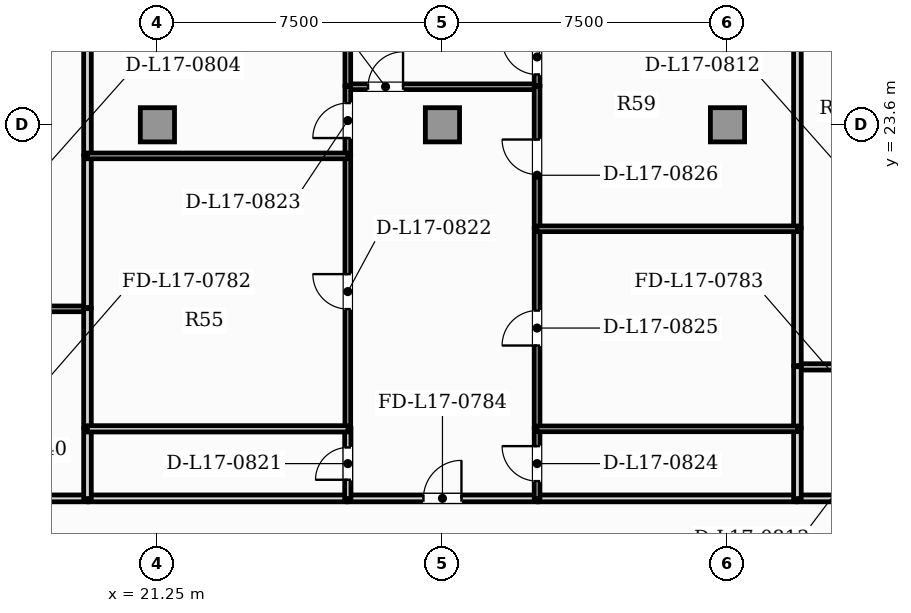
"""IFC4 building model, lengths in metres.
Left out: names, types, materials, properties, quantities, classifications, styles, units other than length and angle.
Written with IfcOpenShell. Run it as: python <this file> out.ifc"""

import sys

from ifc_helpers import new_model, si_unit, direction, frame, frame_2d, origin, origin_2d, place, context, subcontext, project, spatial, rectangle, extrude, element, fill, save


model = new_model("IFC4")
c1 = context("Model", 3, precision=1e-05, world=origin(), true_north=direction((0.0, 1.0)))
c2 = subcontext(c1, "Body", "Model", "MODEL_VIEW")
j1 = project(units=[si_unit("LENGTHUNIT", "METRE"), si_unit("PLANEANGLEUNIT", "RADIAN")], contexts=[c1])
p1 = place(None, origin())
s1 = spatial("IfcSite", under=j1, at=p1, CompositionType="ELEMENT")
p2 = place(p1, origin())
s2 = spatial("IfcBuilding", under=s1, at=p2, CompositionType="ELEMENT")
p3 = place(p2, frame((0.0, 0.0, 72.15)))
s3 = spatial("IfcBuildingStorey", under=s2, at=p3, CompositionType="ELEMENT", Elevation=72.15)
for number, where, z_axis, x_axis in (
    (1, (21.25, 23.6, 0.0), (0.0, 0.0, 1.0), (1.0, 0.0, 0.0)),
    (2, (28.75, 23.6, 0.0), (0.0, 0.0, 1.0), (1.0, 0.0, 0.0)),
    (3, (36.25, 23.6, 0.0), (0.0, 0.0, 1.0), (1.0, 0.0, 0.0)),
):
    element("IfcColumn", number, at=place(p3, frame(where, z_axis=z_axis, x_axis=x_axis)), inside=s3, PredefinedType="COLUMN", context=c2, shape_type="SweptSolid", body=[
        extrude(rectangle(XDim=0.9, YDim=0.9, at=origin_2d()), origin(), (0.0, 0.0, 1.0), 3.85),
    ])
p4 = place(p3, frame((17.268, 13.77, 0.0), z_axis=(0.0, 0.0, 1.0), x_axis=(1.0, 0.0, 0.0)))
e4 = element("IfcWall", 4, at=p4, inside=s3, PredefinedType="PARTITIONING", context=c2, shape_type="SweptSolid", body=[
    extrude(rectangle(XDim=2.147, YDim=0.18, at=frame_2d((1.074, 0.0))), origin(), (0.0, 0.0, 1.0), 3.57),
])
p5 = place(p3, frame((38.085, 13.77, 0.0), z_axis=(0.0, 0.0, 1.0), x_axis=(1.0, 0.0, 0.0)))
e5 = element("IfcWall", 5, at=p5, inside=s3, PredefinedType="PARTITIONING", context=c2, shape_type="SweptSolid", body=[
    extrude(rectangle(XDim=2.162, YDim=0.18, at=frame_2d((1.081, 0.0))), origin(), (0.0, 0.0, 1.0), 3.57),
])
p6 = place(p3, frame((26.255, 13.77, 0.0), z_axis=(0.0, 0.0, 1.0), x_axis=(1.0, 0.0, 0.0)))
e6 = element("IfcWall", 6, at=p6, inside=s3, PredefinedType="PARTITIONING", context=c2, shape_type="SweptSolid", body=[
    extrude(rectangle(XDim=4.99, YDim=0.18, at=frame_2d((2.495, 0.0))), origin(), (0.0, 0.0, 1.0), 3.57),
])
p7 = place(p6, frame((1.995, 0.0, 0.0)))
e7 = element("IfcOpeningElement", 7, at=p7, cuts=e6, PredefinedType="OPENING", context=c2, shape_type="SweptSolid", body=[
    extrude(rectangle(XDim=1.0, YDim=2.15, at=frame_2d((0.5, 1.075))), frame((0.0, 0.1, 0.0), z_axis=(0.0, -1.0, 0.0), x_axis=(1.0, 0.0, 0.0)), (0.0, 0.0, 1.0), 0.2),
])
for number, where, z_axis, x_axis in (
    (8, (19.445, 13.77, 0.0), (0.0, 0.0, 1.0), (1.0, 0.0, 0.0)),
    (9, (31.275, 13.77, 0.0), (0.0, 0.0, 1.0), (1.0, 0.0, 0.0)),
):
    element("IfcWall", number, at=place(p3, frame(where, z_axis=z_axis, x_axis=x_axis)), inside=s3, PredefinedType="PARTITIONING", context=c2, shape_type="SweptSolid", body=[
        extrude(rectangle(XDim=6.78, YDim=0.18, at=frame_2d((3.39, 0.0))), origin(), (0.0, 0.0, 1.0), 3.57),
    ])
p8 = place(p3, frame((17.228, 18.757, 0.0), z_axis=(0.0, 0.0, 1.0), x_axis=(1.0, 0.0, 0.0)))
e10 = element("IfcWall", 10, at=p8, inside=s3, PredefinedType="PARTITIONING", context=c2, shape_type="SweptSolid", body=[
    extrude(rectangle(XDim=2.187, YDim=0.15, at=frame_2d((1.094, 0.0))), origin(), (0.0, 0.0, 1.0), 3.57),
])
p9 = place(p3, frame((19.41, 13.765, 0.0), z_axis=(0.0, 0.0, 1.0), x_axis=(0.0, 1.0, 0.0)))
e11 = element("IfcWall", 11, at=p9, inside=s3, PredefinedType="PARTITIONING", context=c2, shape_type="SweptSolid", body=[
    extrude(rectangle(XDim=1.84, YDim=0.2, at=frame_2d((0.92, 0.0))), origin(), (0.0, 0.0, 1.0), 3.57),
])
p10 = place(p3, frame((19.41, 15.635, 0.0), z_axis=(0.0, 0.0, 1.0), x_axis=(0.0, 1.0, 0.0)))
e12 = element("IfcWall", 12, at=p10, inside=s3, PredefinedType="PARTITIONING", context=c2, shape_type="SweptSolid", body=[
    extrude(rectangle(XDim=3.127, YDim=0.2, at=frame_2d((1.563, 0.0))), origin(), (0.0, 0.0, 1.0), 3.57),
])
p11 = place(p3, frame((19.41, 18.792, 0.0), z_axis=(0.0, 0.0, 1.0), x_axis=(0.0, 1.0, 0.0)))
e13 = element("IfcWall", 13, at=p11, inside=s3, PredefinedType="PARTITIONING", context=c2, shape_type="SweptSolid", body=[
    extrude(rectangle(XDim=3.995, YDim=0.2, at=frame_2d((1.998, 0.0))), origin(), (0.0, 0.0, 1.0), 3.57),
])
p12 = place(p3, frame((19.41, 22.817, 0.0), z_axis=(0.0, 0.0, 1.0), x_axis=(0.0, 1.0, 0.0)))
e14 = element("IfcWall", 14, at=p12, inside=s3, PredefinedType="PARTITIONING", context=c2, shape_type="SweptSolid", body=[
    extrude(rectangle(XDim=10.648, YDim=0.2, at=frame_2d((5.324, 0.0))), origin(), (0.0, 0.0, 1.0), 3.57),
])
p13 = place(p3, frame((38.085, 17.23, 0.0), z_axis=(0.0, 0.0, 1.0), x_axis=(1.0, 0.0, 0.0)))
e15 = element("IfcWall", 15, at=p13, inside=s3, PredefinedType="PLUMBINGWALL", context=c2, shape_type="SweptSolid", body=[
    extrude(rectangle(XDim=2.202, YDim=0.165, at=frame_2d((1.101, 0.0))), origin(), (0.0, 0.0, 1.0), 3.57),
])
p14 = place(p3, frame((38.09, 13.765, 0.0), z_axis=(0.0, 0.0, 1.0), x_axis=(0.0, 1.0, 0.0)))
e16 = element("IfcWall", 16, at=p14, inside=s3, PredefinedType="PARTITIONING", context=c2, shape_type="SweptSolid", body=[
    extrude(rectangle(XDim=1.84, YDim=0.2, at=frame_2d((0.92, 0.0))), origin(), (0.0, 0.0, 1.0), 3.57),
])
p15 = place(p3, frame((38.09, 15.635, 0.0), z_axis=(0.0, 0.0, 1.0), x_axis=(0.0, 1.0, 0.0)))
e17 = element("IfcWall", 17, at=p15, inside=s3, PredefinedType="PARTITIONING", context=c2, shape_type="SweptSolid", body=[
    extrude(rectangle(XDim=1.6, YDim=0.2, at=frame_2d((0.8, 0.0))), origin(), (0.0, 0.0, 1.0), 3.57),
])
p16 = place(p3, frame((38.09, 17.265, 0.0), z_axis=(0.0, 0.0, 1.0), x_axis=(0.0, 1.0, 0.0)))
e18 = element("IfcWall", 18, at=p16, inside=s3, PredefinedType="PARTITIONING", context=c2, shape_type="SweptSolid", body=[
    extrude(rectangle(XDim=3.604, YDim=0.2, at=frame_2d((1.802, 0.0))), origin(), (0.0, 0.0, 1.0), 3.57),
])
p17 = place(p3, frame((38.09, 20.899, 0.0), z_axis=(0.0, 0.0, 1.0), x_axis=(0.0, 1.0, 0.0)))
e19 = element("IfcWall", 19, at=p17, inside=s3, PredefinedType="PARTITIONING", context=c2, shape_type="SweptSolid", body=[
    extrude(rectangle(XDim=5.234, YDim=0.2, at=frame_2d((2.617, 0.0))), origin(), (0.0, 0.0, 1.0), 3.57),
])
p18 = place(p3, frame((26.255, 24.601, 0.0), z_axis=(0.0, 0.0, 1.0), x_axis=(1.0, 0.0, 0.0)))
e20 = element("IfcWall", 20, at=p18, inside=s3, PredefinedType="PARTITIONING", context=c2, shape_type="SweptSolid", body=[
    extrude(rectangle(XDim=4.99, YDim=0.15, at=frame_2d((2.495, 0.0))), origin(), (0.0, 0.0, 1.0), 3.57),
])
p19 = place(p18, frame((0.538, 0.0, 0.0)))
e21 = element("IfcOpeningElement", 21, at=p19, cuts=e20, PredefinedType="OPENING", context=c2, shape_type="SweptSolid", body=[
    extrude(rectangle(XDim=0.92, YDim=2.1, at=frame_2d((0.46, 1.05))), frame((0.0, 0.085, 0.0), z_axis=(0.0, -1.0, 0.0), x_axis=(1.0, 0.0, 0.0)), (0.0, 0.0, 1.0), 0.17),
])
p20 = place(p3, frame((26.26, 13.765, 0.0), z_axis=(0.0, 0.0, 1.0), x_axis=(0.0, 1.0, 0.0)))
e22 = element("IfcWall", 22, at=p20, inside=s3, PredefinedType="PLUMBINGWALL", context=c2, shape_type="SweptSolid", body=[
    extrude(rectangle(XDim=1.84, YDim=0.165, at=frame_2d((0.92, 0.0))), origin(), (0.0, 0.0, 1.0), 3.57),
])
p21 = place(p20, frame((0.495, 0.0, 0.0)))
e23 = element("IfcOpeningElement", 23, at=p21, cuts=e22, PredefinedType="OPENING", context=c2, shape_type="SweptSolid", body=[
    extrude(rectangle(XDim=0.85, YDim=2.1, at=frame_2d((0.425, 1.05))), frame((0.0, 0.093, 0.0), z_axis=(0.0, -1.0, 0.0), x_axis=(1.0, 0.0, 0.0)), (0.0, 0.0, 1.0), 0.185),
])
p22 = place(p3, frame((26.26, 15.635, 0.0), z_axis=(0.0, 0.0, 1.0), x_axis=(0.0, 1.0, 0.0)))
e24 = element("IfcWall", 24, at=p22, inside=s3, PredefinedType="PARTITIONING", context=c2, shape_type="SweptSolid", body=[
    extrude(rectangle(XDim=7.152, YDim=0.15, at=frame_2d((3.576, 0.0))), origin(), (0.0, 0.0, 1.0), 3.57),
])
p23 = place(p22, frame((3.116, 0.0, 0.0)))
e25 = element("IfcOpeningElement", 25, at=p23, cuts=e24, PredefinedType="OPENING", context=c2, shape_type="SweptSolid", body=[
    extrude(rectangle(XDim=0.92, YDim=2.1, at=frame_2d((0.46, 1.05))), frame((0.0, 0.085, 0.0), z_axis=(0.0, -1.0, 0.0), x_axis=(1.0, 0.0, 0.0)), (0.0, 0.0, 1.0), 0.17),
])
p24 = place(p3, frame((26.26, 22.817, 0.0), z_axis=(0.0, 0.0, 1.0), x_axis=(0.0, 1.0, 0.0)))
e26 = element("IfcWall", 26, at=p24, inside=s3, PredefinedType="PARTITIONING", context=c2, shape_type="SweptSolid", body=[
    extrude(rectangle(XDim=1.789, YDim=0.15, at=frame_2d((0.895, 0.0))), origin(), (0.0, 0.0, 1.0), 3.57),
])
p25 = place(p24, frame((0.435, 0.0, 0.0)))
e27 = element("IfcOpeningElement", 27, at=p25, cuts=e26, PredefinedType="OPENING", context=c2, shape_type="SweptSolid", body=[
    extrude(rectangle(XDim=0.92, YDim=2.1, at=frame_2d((0.46, 1.05))), frame((0.0, 0.085, 0.0), z_axis=(0.0, -1.0, 0.0), x_axis=(1.0, 0.0, 0.0)), (0.0, 0.0, 1.0), 0.17),
])
p26 = place(p3, frame((31.24, 13.765, 0.0), z_axis=(0.0, 0.0, 1.0), x_axis=(0.0, 1.0, 0.0)))
e28 = element("IfcWall", 28, at=p26, inside=s3, PredefinedType="PARTITIONING", context=c2, shape_type="SweptSolid", body=[
    extrude(rectangle(XDim=1.84, YDim=0.15, at=frame_2d((0.92, 0.0))), origin(), (0.0, 0.0, 1.0), 3.57),
])
p27 = place(p26, frame((0.46, 0.0, 0.0)))
e29 = element("IfcOpeningElement", 29, at=p27, cuts=e28, PredefinedType="OPENING", context=c2, shape_type="SweptSolid", body=[
    extrude(rectangle(XDim=0.92, YDim=2.1, at=frame_2d((0.46, 1.05))), frame((0.0, 0.085, 0.0), z_axis=(0.0, -1.0, 0.0), x_axis=(1.0, 0.0, 0.0)), (0.0, 0.0, 1.0), 0.17),
])
p28 = place(p3, frame((31.24, 15.635, 0.0), z_axis=(0.0, 0.0, 1.0), x_axis=(0.0, 1.0, 0.0)))
e30 = element("IfcWall", 30, at=p28, inside=s3, PredefinedType="PARTITIONING", context=c2, shape_type="SweptSolid", body=[
    extrude(rectangle(XDim=5.234, YDim=0.15, at=frame_2d((2.617, 0.0))), origin(), (0.0, 0.0, 1.0), 3.57),
])
p29 = place(p28, frame((2.157, 0.0, 0.0)))
e31 = element("IfcOpeningElement", 31, at=p29, cuts=e30, PredefinedType="OPENING", context=c2, shape_type="SweptSolid", body=[
    extrude(rectangle(XDim=0.92, YDim=2.1, at=frame_2d((0.46, 1.05))), frame((0.0, 0.085, 0.0), z_axis=(0.0, -1.0, 0.0), x_axis=(1.0, 0.0, 0.0)), (0.0, 0.0, 1.0), 0.17),
])
p30 = place(p3, frame((31.24, 20.899, 0.0), z_axis=(0.0, 0.0, 1.0), x_axis=(0.0, 1.0, 0.0)))
e32 = element("IfcWall", 32, at=p30, inside=s3, PredefinedType="PARTITIONING", context=c2, shape_type="SweptSolid", body=[
    extrude(rectangle(XDim=3.707, YDim=0.15, at=frame_2d((1.854, 0.0))), origin(), (0.0, 0.0, 1.0), 3.57),
])
p31 = place(p30, frame((1.394, 0.0, 0.0)))
e33 = element("IfcOpeningElement", 33, at=p31, cuts=e32, PredefinedType="OPENING", context=c2, shape_type="SweptSolid", body=[
    extrude(rectangle(XDim=0.92, YDim=2.1, at=frame_2d((0.46, 1.05))), frame((0.0, 0.085, 0.0), z_axis=(0.0, -1.0, 0.0), x_axis=(1.0, 0.0, 0.0)), (0.0, 0.0, 1.0), 0.17),
])
p32 = place(p3, frame((26.26, 24.636, 0.0), z_axis=(0.0, 0.0, 1.0), x_axis=(0.0, 1.0, 0.0)))
e34 = element("IfcWall", 34, at=p32, inside=s3, PredefinedType="PARTITIONING", context=c2, shape_type="SweptSolid", body=[
    extrude(rectangle(XDim=8.869, YDim=0.15, at=frame_2d((4.435, 0.0))), origin(), (0.0, 0.0, 1.0), 3.57),
])
p33 = place(p32, frame((3.975, 0.0, 0.0)))
e35 = element("IfcOpeningElement", 35, at=p33, cuts=e34, PredefinedType="OPENING", context=c2, shape_type="SweptSolid", body=[
    extrude(rectangle(XDim=0.92, YDim=2.1, at=frame_2d((0.46, 1.05))), frame((0.0, 0.085, 0.0), z_axis=(0.0, -1.0, 0.0), x_axis=(1.0, 0.0, 0.0)), (0.0, 0.0, 1.0), 0.17),
])
p34 = place(p3, frame((31.24, 24.636, 0.0), z_axis=(0.0, 0.0, 1.0), x_axis=(0.0, 1.0, 0.0)))
e36 = element("IfcWall", 36, at=p34, inside=s3, PredefinedType="PARTITIONING", context=c2, shape_type="SweptSolid", body=[
    extrude(rectangle(XDim=1.497, YDim=0.15, at=frame_2d((0.748, 0.0))), origin(), (0.0, 0.0, 1.0), 3.57),
])
p35 = place(p34, frame((0.288, 0.0, 0.0)))
e37 = element("IfcOpeningElement", 37, at=p35, cuts=e36, PredefinedType="OPENING", context=c2, shape_type="SweptSolid", body=[
    extrude(rectangle(XDim=0.92, YDim=2.1, at=frame_2d((0.46, 1.05))), frame((0.0, 0.085, 0.0), z_axis=(0.0, -1.0, 0.0), x_axis=(1.0, 0.0, 0.0)), (0.0, 0.0, 1.0), 0.17),
])
p36 = place(p3, frame((19.405, 15.6, 0.0), z_axis=(0.0, 0.0, 1.0), x_axis=(1.0, 0.0, 0.0)))
e38 = element("IfcWall", 38, at=p36, inside=s3, PredefinedType="PLUMBINGWALL", context=c2, shape_type="SweptSolid", body=[
    extrude(rectangle(XDim=6.86, YDim=0.165, at=frame_2d((3.43, 0.0))), origin(), (0.0, 0.0, 1.0), 3.57),
])
for number, where, z_axis, x_axis in (
    (39, (19.405, 22.782, 0.0), (0.0, 0.0, 1.0), (1.0, 0.0, 0.0)),
    (40, (31.235, 15.6, 0.0), (0.0, 0.0, 1.0), (1.0, 0.0, 0.0)),
    (41, (31.235, 20.864, 0.0), (0.0, 0.0, 1.0), (1.0, 0.0, 0.0)),
):
    element("IfcWall", number, at=place(p3, frame(where, z_axis=z_axis, x_axis=x_axis)), inside=s3, PredefinedType="PARTITIONING", context=c2, shape_type="SweptSolid", body=[
        extrude(rectangle(XDim=6.86, YDim=0.15, at=frame_2d((3.43, 0.0))), origin(), (0.0, 0.0, 1.0), 3.57),
    ])
p37 = place(p7, origin())
e42 = element("IfcDoor", 42, at=p37, inside=s3, OperationType="SINGLE_SWING_RIGHT", PredefinedType="DOOR", context=c2, shape_type="SweptSolid", body=[
    extrude(rectangle(XDim=1.0, YDim=2.15, at=frame_2d((0.5, 1.075))), frame((0.0, 0.025, 0.0), z_axis=(0.0, -1.0, 0.0), x_axis=(1.0, 0.0, 0.0)), (0.0, 0.0, 1.0), 0.05),
])
fill(e7, e42)
p38 = place(p19, origin())
e43 = element("IfcDoor", 43, at=p38, inside=s3, OperationType="SINGLE_SWING_RIGHT", PredefinedType="DOOR", context=c2, shape_type="SweptSolid", body=[
    extrude(rectangle(XDim=0.92, YDim=2.1, at=frame_2d((0.46, 1.05))), frame((0.0, 0.025, 0.0), z_axis=(0.0, -1.0, 0.0), x_axis=(1.0, 0.0, 0.0)), (0.0, 0.0, 1.0), 0.05),
])
fill(e21, e43)
p39 = place(p21, origin())
e44 = element("IfcDoor", 44, at=p39, inside=s3, OperationType="SINGLE_SWING_LEFT", PredefinedType="DOOR", context=c2, shape_type="SweptSolid", body=[
    extrude(rectangle(XDim=0.85, YDim=2.1, at=frame_2d((0.425, 1.05))), frame((0.0, 0.025, 0.0), z_axis=(0.0, -1.0, 0.0), x_axis=(1.0, 0.0, 0.0)), (0.0, 0.0, 1.0), 0.05),
])
fill(e23, e44)
p40 = place(p23, origin())
e45 = element("IfcDoor", 45, at=p40, inside=s3, OperationType="SINGLE_SWING_RIGHT", PredefinedType="DOOR", context=c2, shape_type="SweptSolid", body=[
    extrude(rectangle(XDim=0.92, YDim=2.1, at=frame_2d((0.46, 1.05))), frame((0.0, 0.025, 0.0), z_axis=(0.0, -1.0, 0.0), x_axis=(1.0, 0.0, 0.0)), (0.0, 0.0, 1.0), 0.05),
])
fill(e25, e45)
p41 = place(p25, origin())
e46 = element("IfcDoor", 46, at=p41, inside=s3, OperationType="SINGLE_SWING_LEFT", PredefinedType="DOOR", context=c2, shape_type="SweptSolid", body=[
    extrude(rectangle(XDim=0.92, YDim=2.1, at=frame_2d((0.46, 1.05))), frame((0.0, 0.025, 0.0), z_axis=(0.0, -1.0, 0.0), x_axis=(1.0, 0.0, 0.0)), (0.0, 0.0, 1.0), 0.05),
])
fill(e27, e46)
p42 = place(p27, origin())
e47 = element("IfcDoor", 47, at=p42, inside=s3, OperationType="SINGLE_SWING_RIGHT", PredefinedType="DOOR", context=c2, shape_type="SweptSolid", body=[
    extrude(rectangle(XDim=0.92, YDim=2.1, at=frame_2d((0.46, 1.05))), frame((0.0, 0.025, 0.0), z_axis=(0.0, -1.0, 0.0), x_axis=(1.0, 0.0, 0.0)), (0.0, 0.0, 1.0), 0.05),
])
fill(e29, e47)
p43 = place(p29, origin())
e48 = element("IfcDoor", 48, at=p43, inside=s3, OperationType="SINGLE_SWING_LEFT", PredefinedType="DOOR", context=c2, shape_type="SweptSolid", body=[
    extrude(rectangle(XDim=0.92, YDim=2.1, at=frame_2d((0.46, 1.05))), frame((0.0, 0.025, 0.0), z_axis=(0.0, -1.0, 0.0), x_axis=(1.0, 0.0, 0.0)), (0.0, 0.0, 1.0), 0.05),
])
fill(e31, e48)
p44 = place(p31, origin())
e49 = element("IfcDoor", 49, at=p44, inside=s3, OperationType="SINGLE_SWING_RIGHT", PredefinedType="DOOR", context=c2, shape_type="SweptSolid", body=[
    extrude(rectangle(XDim=0.92, YDim=2.1, at=frame_2d((0.46, 1.05))), frame((0.0, 0.025, 0.0), z_axis=(0.0, -1.0, 0.0), x_axis=(1.0, 0.0, 0.0)), (0.0, 0.0, 1.0), 0.05),
])
fill(e33, e49)
p45 = place(p35, origin())
e50 = element("IfcDoor", 50, at=p45, inside=s3, OperationType="SINGLE_SWING_RIGHT", PredefinedType="DOOR", context=c2, shape_type="SweptSolid", body=[
    extrude(rectangle(XDim=0.92, YDim=2.1, at=frame_2d((0.46, 1.05))), frame((0.0, 0.025, 0.0), z_axis=(0.0, -1.0, 0.0), x_axis=(1.0, 0.0, 0.0)), (0.0, 0.0, 1.0), 0.05),
])
fill(e37, e50)
save(model, sys.argv[1])
